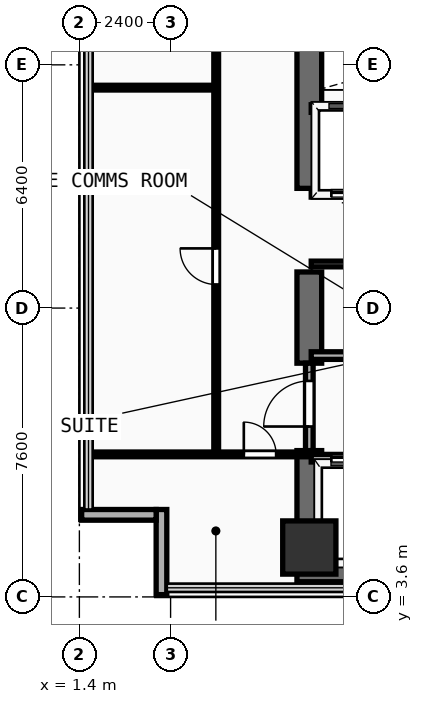
"""IFC4 building model, lengths in metres.
Left out: names, types, materials, properties, quantities, classifications, styles, units other than length and angle.
Written with IfcOpenShell. Run it as: python <this file> out.ifc"""

import sys

from ifc_helpers import new_model, si_unit, direction, frame, frame_2d, origin, origin_2d, place, context, subcontext, project, spatial, rectangle, extrude, element, fill, save


model = new_model("IFC4")
c1 = context("Model", 3, precision=1e-05, world=origin(), true_north=direction((0.0, 1.0)))
c2 = subcontext(c1, "Body", "Model", "MODEL_VIEW")
j1 = project(units=[si_unit("LENGTHUNIT", "METRE"), si_unit("PLANEANGLEUNIT", "RADIAN")], contexts=[c1])
p1 = place(None, origin())
s1 = spatial("IfcSite", under=j1, at=p1, CompositionType="ELEMENT")
p2 = place(p1, origin())
s2 = spatial("IfcBuilding", under=s1, at=p2, CompositionType="ELEMENT")
p3 = place(p2, frame((0.0, 0.0, 122.1)))
s3 = spatial("IfcBuildingStorey", under=s2, at=p3, CompositionType="ELEMENT", Elevation=122.1)
p4 = place(p3, frame((7.125, 4.325, 0.0), z_axis=(0.0, 0.0, 1.0), x_axis=(1.0, 0.0, 0.0)))
e1 = element("IfcWall", 1, at=p4, inside=s3, PredefinedType="SHEAR", context=c2, shape_type="SweptSolid", body=[
    extrude(rectangle(XDim=14.0, YDim=0.65, at=frame_2d((7.0, 0.0))), origin(), (0.0, 0.0, 1.0), 3.54),
])
p5 = place(p3, frame((7.45, 4.65, 0.0), z_axis=(0.0, 0.0, 1.0), x_axis=(0.0, 1.0, 0.0)))
e2 = element("IfcWall", 2, at=p5, inside=s3, PredefinedType="SHEAR", context=c2, shape_type="SweptSolid", body=[
    extrude(rectangle(XDim=2.8, YDim=0.65, at=frame_2d((1.4, 0.0))), origin(), (0.0, 0.0, 1.0), 3.54),
])
p6 = place(p3, frame((7.45, 9.75, 0.0), z_axis=(0.0, 0.0, 1.0), x_axis=(0.0, 1.0, 0.0)))
e3 = element("IfcWall", 3, at=p6, inside=s3, PredefinedType="SHEAR", context=c2, shape_type="SweptSolid", body=[
    extrude(rectangle(XDim=2.4, YDim=0.65, at=frame_2d((1.2, 0.0))), origin(), (0.0, 0.0, 1.0), 3.54),
])
p7 = place(p3, frame((7.45, 14.35, 0.0), z_axis=(0.0, 0.0, 1.0), x_axis=(0.0, 1.0, 0.0)))
e4 = element("IfcWall", 4, at=p7, inside=s3, PredefinedType="SHEAR", context=c2, shape_type="SweptSolid", body=[
    extrude(rectangle(XDim=4.81, YDim=0.65, at=frame_2d((2.405, 0.0))), origin(), (0.0, 0.0, 1.0), 3.54),
])
p8 = place(p3, frame((7.45, 4.9, 0.0), z_axis=(0.0, 0.0, 1.0), x_axis=(1.0, 0.0, 0.0)))
e5 = element("IfcColumn", 5, at=p8, inside=s3, PredefinedType="COLUMN", context=c2, shape_type="SweptSolid", body=[
    extrude(rectangle(XDim=1.4, YDim=1.4, at=origin_2d()), origin(), (0.0, 0.0, 1.0), 3.54),
])
p9 = place(p3, frame((3.56, 3.66, 0.0), z_axis=(0.0, 0.0, 1.0), x_axis=(0.0, 1.0, 0.0)))
e6 = element("IfcWall", 6, at=p9, inside=s3, PredefinedType="SOLIDWALL", context=c2, shape_type="SweptSolid", body=[
    extrude(rectangle(XDim=2.24, YDim=0.28, at=frame_2d((1.12, 0.0))), origin(), (0.0, 0.0, 1.0), 3.54),
])
p10 = place(p3, frame((1.46, 5.76, 0.0), z_axis=(0.0, 0.0, 1.0), x_axis=(1.0, 0.0, 0.0)))
e7 = element("IfcWall", 7, at=p10, inside=s3, PredefinedType="SOLIDWALL", context=c2, shape_type="SweptSolid", body=[
    extrude(rectangle(XDim=1.96, YDim=0.28, at=frame_2d((0.98, 0.0))), origin(), (0.0, 0.0, 1.0), 3.54),
])
p11 = place(p3, frame((7.5, 7.25, 0.0), z_axis=(0.0, 0.0, 1.0), x_axis=(1.0, 0.0, 0.0)))
e8 = element("IfcWall", 8, at=p11, inside=s3, PredefinedType="PARTITIONING", context=c2, shape_type="SweptSolid", body=[
    extrude(rectangle(XDim=8.35, YDim=0.2, at=frame_2d((4.175, 0.0))), origin(), (0.0, 0.0, 1.0), 3.54),
])
p12 = place(p11, frame((0.53, 0.0, 0.0)))
e9 = element("IfcOpeningElement", 9, at=p12, cuts=e8, PredefinedType="OPENING", context=c2, shape_type="SweptSolid", body=[
    extrude(rectangle(XDim=1.1, YDim=2.2, at=frame_2d((0.55, 1.1))), frame((0.0, 0.11, 0.0), z_axis=(0.0, -1.0, 0.0), x_axis=(1.0, 0.0, 0.0)), (0.0, 0.0, 1.0), 0.22),
])
p13 = place(p11, frame((2.37, 0.0, 0.0)))
e10 = element("IfcOpeningElement", 10, at=p13, cuts=e8, PredefinedType="OPENING", context=c2, shape_type="SweptSolid", body=[
    extrude(rectangle(XDim=1.1, YDim=2.2, at=frame_2d((0.55, 1.1))), frame((0.0, 0.11, 0.0), z_axis=(0.0, -1.0, 0.0), x_axis=(1.0, 0.0, 0.0)), (0.0, 0.0, 1.0), 0.22),
])
p14 = place(p11, frame((4.33, 0.0, 0.0)))
e11 = element("IfcOpeningElement", 11, at=p14, cuts=e8, PredefinedType="OPENING", context=c2, shape_type="SweptSolid", body=[
    extrude(rectangle(XDim=1.1, YDim=2.2, at=frame_2d((0.55, 1.1))), frame((0.0, 0.11, 0.0), z_axis=(0.0, -1.0, 0.0), x_axis=(1.0, 0.0, 0.0)), (0.0, 0.0, 1.0), 0.22),
])
p15 = place(p11, frame((6.5, 0.0, 0.0)))
e12 = element("IfcOpeningElement", 12, at=p15, cuts=e8, PredefinedType="OPENING", context=c2, shape_type="SweptSolid", body=[
    extrude(rectangle(XDim=1.1, YDim=2.2, at=frame_2d((0.55, 1.1))), frame((0.0, 0.11, 0.0), z_axis=(0.0, -1.0, 0.0), x_axis=(1.0, 0.0, 0.0)), (0.0, 0.0, 1.0), 0.22),
])
p16 = place(p3, frame((7.5, 9.95, 0.0), z_axis=(0.0, 0.0, 1.0), x_axis=(1.0, 0.0, 0.0)))
e13 = element("IfcWall", 13, at=p16, inside=s3, PredefinedType="PARTITIONING", context=c2, shape_type="SweptSolid", body=[
    extrude(rectangle(XDim=8.35, YDim=0.2, at=frame_2d((4.175, 0.0))), origin(), (0.0, 0.0, 1.0), 3.54),
])
p17 = place(p3, frame((7.45, 7.45, 0.0), z_axis=(0.0, 0.0, 1.0), x_axis=(0.0, 1.0, 0.0)))
e14 = element("IfcWall", 14, at=p17, inside=s3, PredefinedType="PARTITIONING", context=c2, shape_type="SweptSolid", body=[
    extrude(rectangle(XDim=2.3, YDim=0.2, at=frame_2d((1.15, 0.0))), origin(), (0.0, 0.0, 1.0), 2.52),
])
p18 = place(p17, frame((0.633, 0.0, 0.0)))
e15 = element("IfcOpeningElement", 15, at=p18, cuts=e14, PredefinedType="OPENING", context=c2, shape_type="SweptSolid", body=[
    extrude(rectangle(XDim=1.2, YDim=2.25, at=frame_2d((0.6, 1.125))), frame((0.0, 0.11, 0.0), z_axis=(0.0, -1.0, 0.0), x_axis=(1.0, 0.0, 0.0)), (0.0, 0.0, 1.0), 0.22),
])
p19 = place(p3, frame((7.5, 12.36, 0.0), z_axis=(0.0, 0.0, 1.0), x_axis=(1.0, 0.0, 0.0)))
e16 = element("IfcWall", 16, at=p19, inside=s3, PredefinedType="PARTITIONING", context=c2, shape_type="SweptSolid", body=[
    extrude(rectangle(XDim=7.85, YDim=0.15, at=frame_2d((3.925, 0.0))), origin(), (0.0, 0.0, 1.0), 3.54),
])
p20 = place(p19, frame((1.65, 0.0, 0.0)))
e17 = element("IfcOpeningElement", 17, at=p20, cuts=e16, PredefinedType="OPENING", context=c2, shape_type="SweptSolid", body=[
    extrude(rectangle(XDim=0.85, YDim=2.15, at=frame_2d((0.425, 1.075))), frame((0.0, 0.085, 0.0), z_axis=(0.0, -1.0, 0.0), x_axis=(1.0, 0.0, 0.0)), (0.0, 0.0, 1.0), 0.17),
])
p21 = place(p19, frame((5.329, 0.0, 0.0)))
e18 = element("IfcOpeningElement", 18, at=p21, cuts=e16, PredefinedType="OPENING", context=c2, shape_type="SweptSolid", body=[
    extrude(rectangle(XDim=0.85, YDim=2.15, at=frame_2d((0.425, 1.075))), frame((0.0, 0.085, 0.0), z_axis=(0.0, -1.0, 0.0), x_axis=(1.0, 0.0, 0.0)), (0.0, 0.0, 1.0), 0.17),
])
p22 = place(p3, frame((7.5, 14.22, 0.0), z_axis=(0.0, 0.0, 1.0), x_axis=(1.0, 0.0, 0.0)))
e19 = element("IfcWall", 19, at=p22, inside=s3, PredefinedType="PARTITIONING", context=c2, shape_type="SweptSolid", body=[
    extrude(rectangle(XDim=7.85, YDim=0.2, at=frame_2d((3.925, 0.0))), origin(), (0.0, 0.0, 1.0), 3.54),
])
p23 = place(p22, frame((0.53, 0.0, 0.0)))
e20 = element("IfcOpeningElement", 20, at=p23, cuts=e19, PredefinedType="OPENING", context=c2, shape_type="SweptSolid", body=[
    extrude(rectangle(XDim=1.1, YDim=2.2, at=frame_2d((0.55, 1.1))), frame((0.0, 0.11, 0.0), z_axis=(0.0, -1.0, 0.0), x_axis=(1.0, 0.0, 0.0)), (0.0, 0.0, 1.0), 0.22),
])
p24 = place(p22, frame((2.42, 0.0, 0.0)))
e21 = element("IfcOpeningElement", 21, at=p24, cuts=e19, PredefinedType="OPENING", context=c2, shape_type="SweptSolid", body=[
    extrude(rectangle(XDim=1.1, YDim=2.2, at=frame_2d((0.55, 1.1))), frame((0.0, 0.11, 0.0), z_axis=(0.0, -1.0, 0.0), x_axis=(1.0, 0.0, 0.0)), (0.0, 0.0, 1.0), 0.22),
])
p25 = place(p22, frame((4.31, 0.0, 0.0)))
e22 = element("IfcOpeningElement", 22, at=p25, cuts=e19, PredefinedType="OPENING", context=c2, shape_type="SweptSolid", body=[
    extrude(rectangle(XDim=1.1, YDim=2.2, at=frame_2d((0.55, 1.1))), frame((0.0, 0.11, 0.0), z_axis=(0.0, -1.0, 0.0), x_axis=(1.0, 0.0, 0.0)), (0.0, 0.0, 1.0), 0.22),
])
p26 = place(p22, frame((6.2, 0.0, 0.0)))
e23 = element("IfcOpeningElement", 23, at=p26, cuts=e19, PredefinedType="OPENING", context=c2, shape_type="SweptSolid", body=[
    extrude(rectangle(XDim=1.1, YDim=2.2, at=frame_2d((0.55, 1.1))), frame((0.0, 0.11, 0.0), z_axis=(0.0, -1.0, 0.0), x_axis=(1.0, 0.0, 0.0)), (0.0, 0.0, 1.0), 0.22),
])
p27 = place(p3, frame((7.5, 16.45, 0.0), z_axis=(0.0, 0.0, 1.0), x_axis=(1.0, 0.0, 0.0)))
e24 = element("IfcWall", 24, at=p27, inside=s3, PredefinedType="PARTITIONING", context=c2, shape_type="SweptSolid", body=[
    extrude(rectangle(XDim=7.85, YDim=0.2, at=frame_2d((3.925, 0.0))), origin(), (0.0, 0.0, 1.0), 3.54),
])
p28 = place(p3, frame((1.64, 7.35, 0.0), z_axis=(0.0, 0.0, 1.0), x_axis=(1.0, 0.0, 0.0)))
e25 = element("IfcWall", 25, at=p28, inside=s3, PredefinedType="PARTITIONING", context=c2, shape_type="SweptSolid", body=[
    extrude(rectangle(XDim=5.76, YDim=0.125, at=frame_2d((2.88, 0.0))), origin(), (0.0, 0.0, 1.0), 3.54),
])
p29 = place(p28, frame((4.087, 0.0, 0.0)))
e26 = element("IfcOpeningElement", 26, at=p29, cuts=e25, PredefinedType="OPENING", context=c2, shape_type="SweptSolid", body=[
    extrude(rectangle(XDim=0.85, YDim=2.15, at=frame_2d((0.425, 1.075))), frame((0.0, 0.073, 0.0), z_axis=(0.0, -1.0, 0.0), x_axis=(1.0, 0.0, 0.0)), (0.0, 0.0, 1.0), 0.145),
])
p30 = place(p3, frame((5.0, 7.5, 0.0), z_axis=(0.0, 0.0, 1.0), x_axis=(0.0, 1.0, 0.0)))
e27 = element("IfcWall", 27, at=p30, inside=s3, PredefinedType="PARTITIONING", context=c2, shape_type="SweptSolid", body=[
    extrude(rectangle(XDim=17.75, YDim=0.125, at=frame_2d((8.875, 0.0))), origin(), (0.0, 0.0, 1.0), 3.54),
])
p31 = place(p30, frame((4.32, 0.0, 0.0)))
e28 = element("IfcOpeningElement", 28, at=p31, cuts=e27, PredefinedType="OPENING", context=c2, shape_type="SweptSolid", body=[
    extrude(rectangle(XDim=0.95, YDim=2.15, at=frame_2d((0.475, 1.075))), frame((0.0, 0.073, 0.0), z_axis=(0.0, -1.0, 0.0), x_axis=(1.0, 0.0, 0.0)), (0.0, 0.0, 1.0), 0.145),
])
p32 = place(p30, frame((13.079, 0.0, 0.0)))
e29 = element("IfcOpeningElement", 29, at=p32, cuts=e27, PredefinedType="OPENING", context=c2, shape_type="SweptSolid", body=[
    extrude(rectangle(XDim=0.95, YDim=2.15, at=frame_2d((0.475, 1.075))), frame((0.0, 0.073, 0.0), z_axis=(0.0, -1.0, 0.0), x_axis=(1.0, 0.0, 0.0)), (0.0, 0.0, 1.0), 0.145),
])
p33 = place(p3, frame((1.64, 17.0, 0.0), z_axis=(0.0, 0.0, 1.0), x_axis=(1.0, 0.0, 0.0)))
e30 = element("IfcWall", 30, at=p33, inside=s3, PredefinedType="PARTITIONING", context=c2, shape_type="SweptSolid", body=[
    extrude(rectangle(XDim=3.36, YDim=0.125, at=frame_2d((1.68, 0.0))), origin(), (0.0, 0.0, 1.0), 3.54),
])
p34 = place(p12, origin())
e31 = element("IfcDoor", 31, at=p34, inside=s3, OperationType="SLIDING_TO_LEFT", PredefinedType="DOOR", context=c2, shape_type="SweptSolid", body=[
    extrude(rectangle(XDim=1.1, YDim=2.2, at=frame_2d((0.55, 1.1))), frame((0.0, 0.025, 0.0), z_axis=(0.0, -1.0, 0.0), x_axis=(1.0, 0.0, 0.0)), (0.0, 0.0, 1.0), 0.05),
])
fill(e9, e31)
p35 = place(p18, frame((1.2, 0.0, 0.0), z_axis=(0.0, 0.0, 1.0), x_axis=(-1.0, 0.0, 0.0)))
e32 = element("IfcDoor", 32, at=p35, inside=s3, OperationType="SINGLE_SWING_RIGHT", PredefinedType="DOOR", context=c2, shape_type="SweptSolid", body=[
    extrude(rectangle(XDim=1.2, YDim=2.25, at=frame_2d((0.6, 1.125))), frame((0.0, 0.025, 0.0), z_axis=(0.0, -1.0, 0.0), x_axis=(1.0, 0.0, 0.0)), (0.0, 0.0, 1.0), 0.05),
])
fill(e15, e32)
p36 = place(p23, frame((1.1, 0.0, 0.0), z_axis=(0.0, 0.0, 1.0), x_axis=(-1.0, 0.0, 0.0)))
e33 = element("IfcDoor", 33, at=p36, inside=s3, OperationType="SLIDING_TO_LEFT", PredefinedType="DOOR", context=c2, shape_type="SweptSolid", body=[
    extrude(rectangle(XDim=1.1, YDim=2.2, at=frame_2d((0.55, 1.1))), frame((0.0, 0.025, 0.0), z_axis=(0.0, -1.0, 0.0), x_axis=(1.0, 0.0, 0.0)), (0.0, 0.0, 1.0), 0.05),
])
fill(e20, e33)
p37 = place(p29, origin())
e34 = element("IfcDoor", 34, at=p37, inside=s3, OperationType="SINGLE_SWING_LEFT", PredefinedType="DOOR", context=c2, shape_type="SweptSolid", body=[
    extrude(rectangle(XDim=0.85, YDim=2.15, at=frame_2d((0.425, 1.075))), frame((0.0, 0.025, 0.0), z_axis=(0.0, -1.0, 0.0), x_axis=(1.0, 0.0, 0.0)), (0.0, 0.0, 1.0), 0.05),
])
fill(e26, e34)
p38 = place(p31, origin())
e35 = element("IfcDoor", 35, at=p38, inside=s3, OperationType="SINGLE_SWING_RIGHT", PredefinedType="DOOR", context=c2, shape_type="SweptSolid", body=[
    extrude(rectangle(XDim=0.95, YDim=2.15, at=frame_2d((0.475, 1.075))), frame((0.0, 0.025, 0.0), z_axis=(0.0, -1.0, 0.0), x_axis=(1.0, 0.0, 0.0)), (0.0, 0.0, 1.0), 0.05),
])
fill(e28, e35)
save(model, sys.argv[1])
